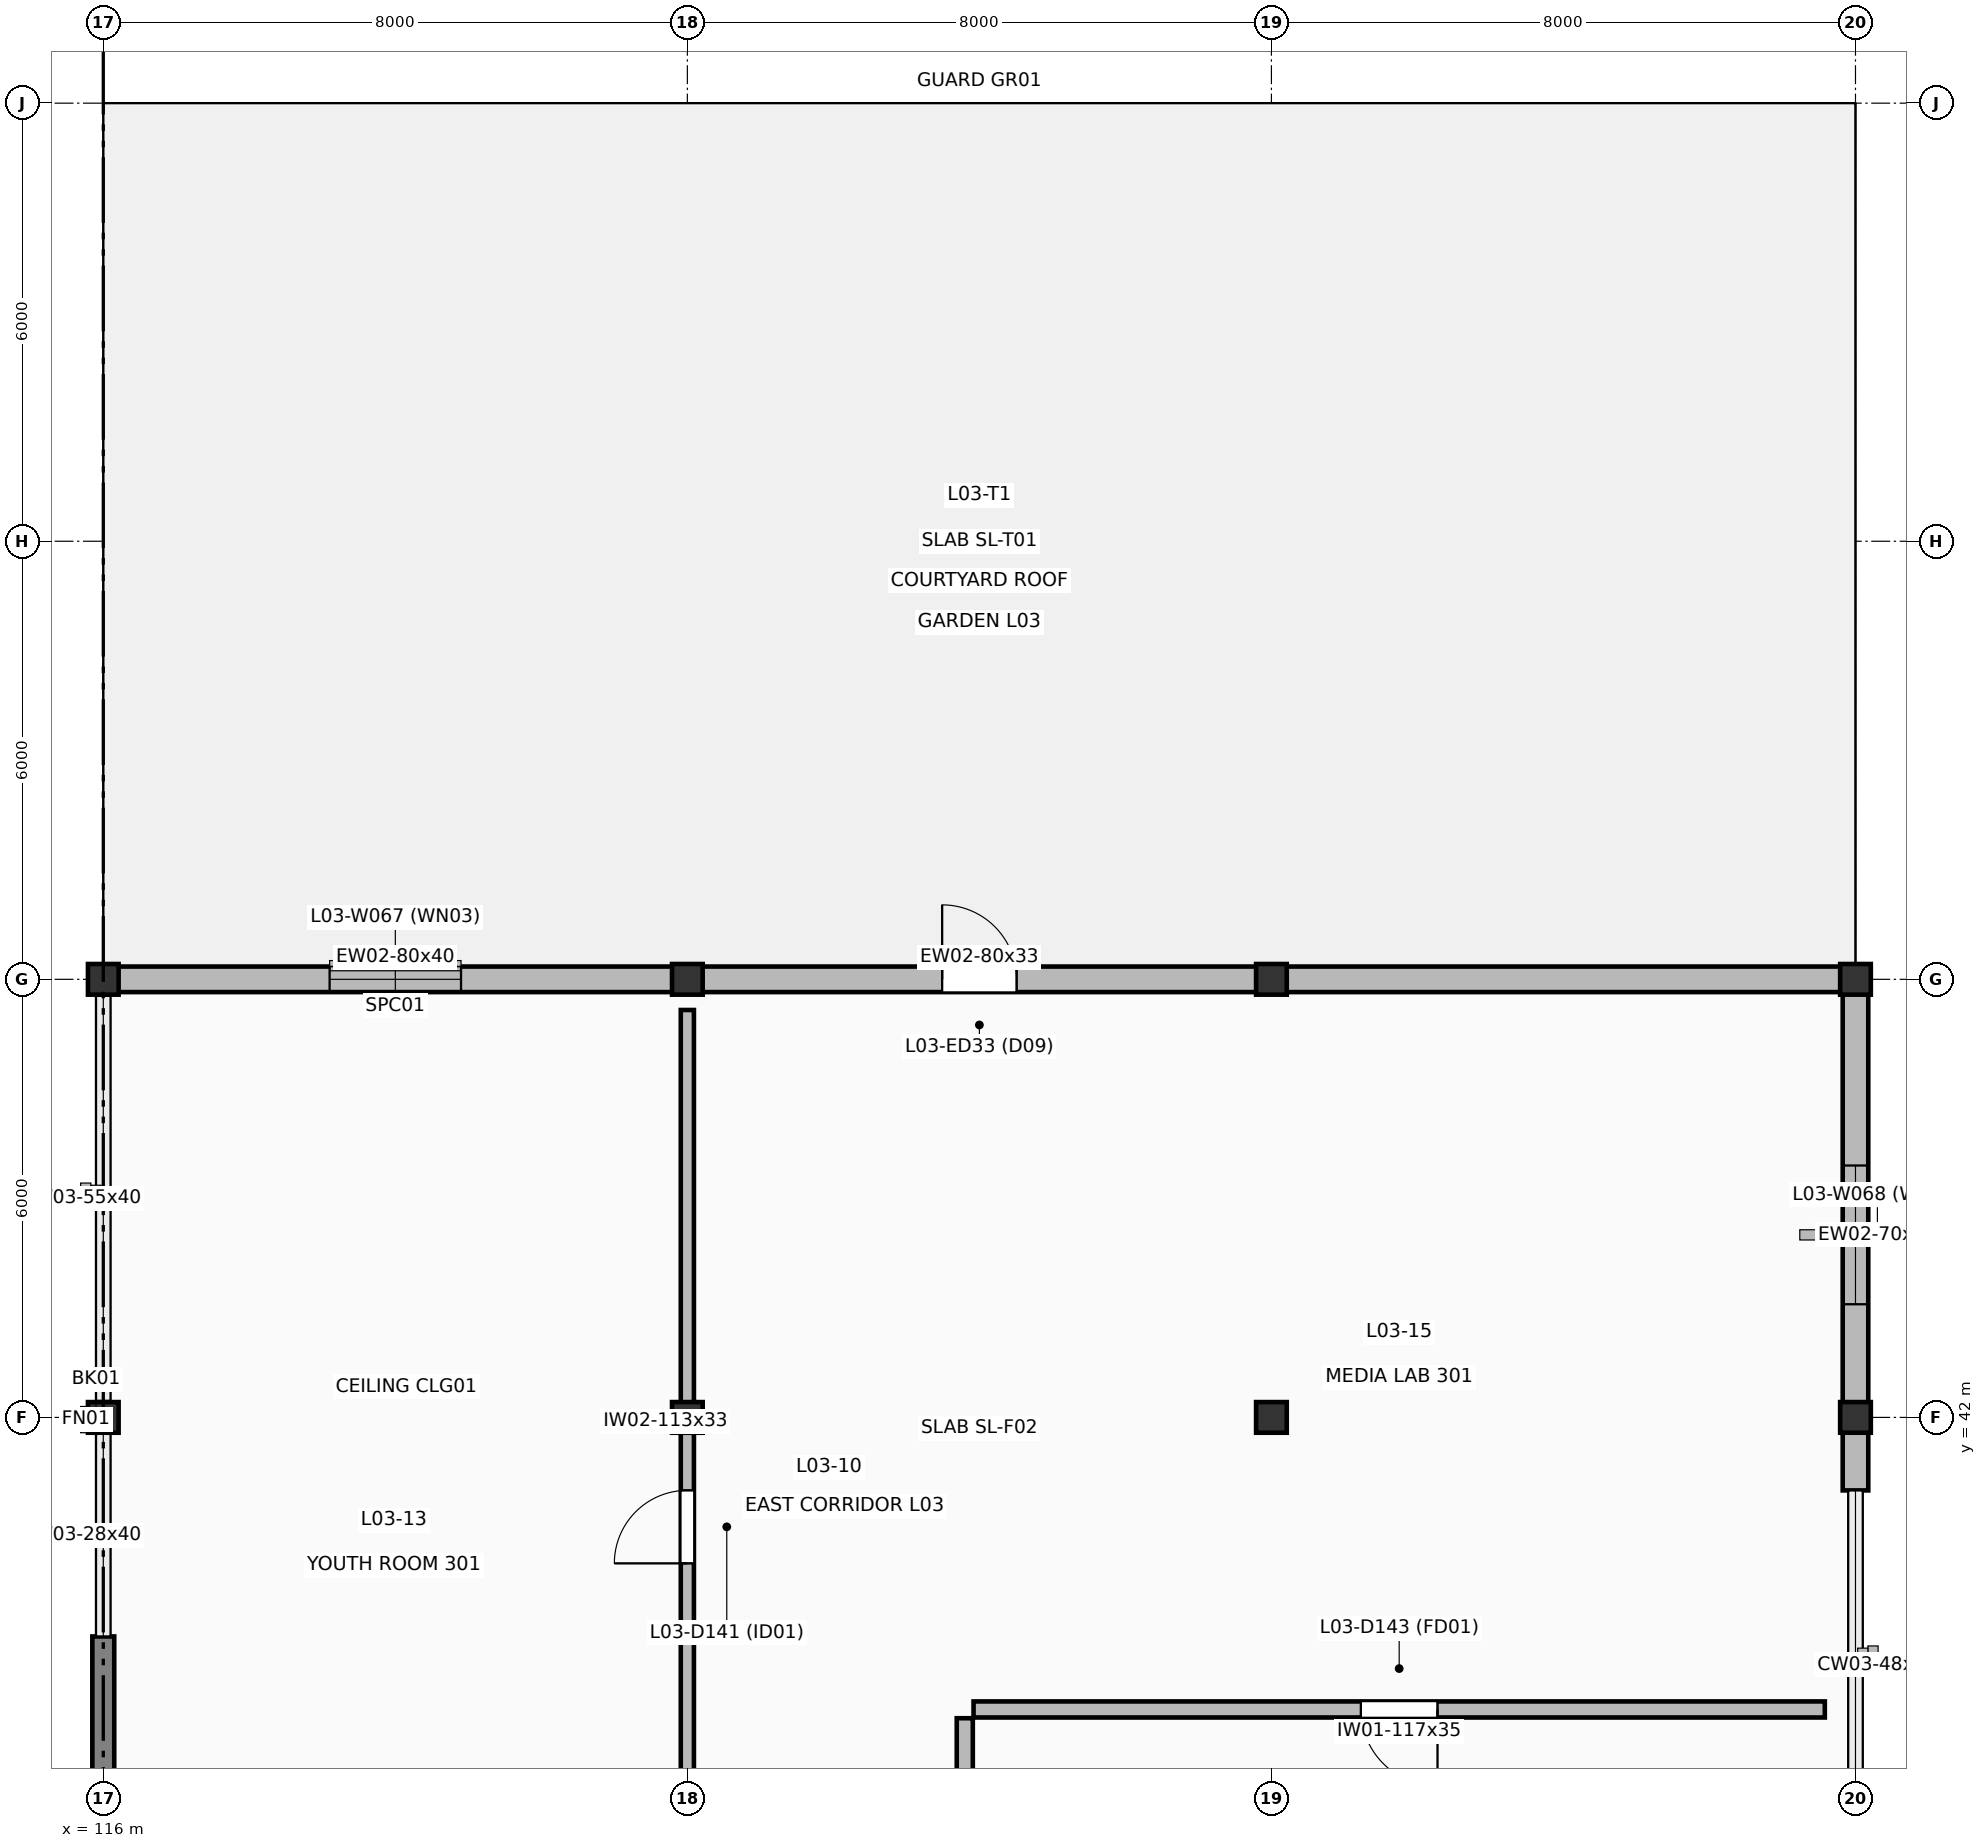
"""IFC4 building model, lengths in metres.
Left out: names, types, materials, properties, quantities, classifications, styles, units other than length and angle.
Written with IfcOpenShell. Run it as: python <this file> out.ifc"""

import sys

from ifc_helpers import new_model, si_unit, direction, frame, frame_2d, origin, origin_2d, place, context, subcontext, project, spatial, rectangle, extrude, element, fill, save


model = new_model("IFC4")
c1 = context("Model", 3, precision=1e-05, world=origin(), true_north=direction((0.0, 1.0)))
c2 = subcontext(c1, "Body", "Model", "MODEL_VIEW")
j1 = project(units=[si_unit("LENGTHUNIT", "METRE"), si_unit("PLANEANGLEUNIT", "RADIAN")], contexts=[c1])
p1 = place(None, origin())
s1 = spatial("IfcSite", under=j1, at=p1, CompositionType="ELEMENT")
p2 = place(p1, origin())
s2 = spatial("IfcBuilding", under=s1, at=p2, CompositionType="ELEMENT")
p3 = place(p2, frame((0.0, 0.0, 13.8)))
s3 = spatial("IfcBuildingStorey", under=s2, at=p3, CompositionType="ELEMENT", Elevation=13.8)
for number, where, z_axis, x_axis in (
    (1, (116.0, 42.0, 0.0), (0.0, 0.0, 1.0), (1.0, 0.0, 0.0)),
    (2, (116.0, 48.0, 0.0), (0.0, 0.0, 1.0), (1.0, 0.0, 0.0)),
    (3, (124.0, 42.0, 0.0), (0.0, 0.0, 1.0), (1.0, 0.0, 0.0)),
    (4, (124.0, 48.0, 0.0), (0.0, 0.0, 1.0), (1.0, 0.0, 0.0)),
    (5, (132.0, 42.0, 0.0), (0.0, 0.0, 1.0), (1.0, 0.0, 0.0)),
    (6, (132.0, 48.0, 0.0), (0.0, 0.0, 1.0), (1.0, 0.0, 0.0)),
    (7, (140.0, 42.0, 0.0), (0.0, 0.0, 1.0), (1.0, 0.0, 0.0)),
    (8, (140.0, 48.0, 0.0), (0.0, 0.0, 1.0), (1.0, 0.0, 0.0)),
):
    element("IfcColumn", number, at=place(p3, frame(where, z_axis=z_axis, x_axis=x_axis)), inside=s3, PredefinedType="COLUMN", context=c2, shape_type="SweptSolid", body=[
        extrude(rectangle(XDim=0.42, YDim=0.42, at=origin_2d()), origin(), (0.0, 0.0, 1.0), 4.2),
    ])
p4 = place(p3, frame((116.0, 30.0, 0.0), z_axis=(0.0, 0.0, 1.0), x_axis=(0.0, 1.0, 0.0)))
e9 = element("IfcWall", 9, at=p4, inside=s3, PredefinedType="SOLIDWALL", context=c2, shape_type="SweptSolid", body=[
    extrude(rectangle(XDim=9.0, YDim=0.3, at=frame_2d((4.5, 0.0))), origin(), (0.0, 0.0, 1.0), 4.2),
])
p5 = place(p3, frame((116.0, 48.0, 0.0), z_axis=(0.0, 0.0, 1.0), x_axis=(1.0, 0.0, 0.0)))
e10 = element("IfcWall", 10, at=p5, inside=s3, PredefinedType="SOLIDWALL", context=c2, shape_type="SweptSolid", body=[
    extrude(rectangle(XDim=8.0, YDim=0.35, at=frame_2d((4.0, 0.0))), origin(), (0.0, 0.0, 1.0), 3.98),
])
p6 = place(p5, frame((3.1, 0.0, 0.85)))
e11 = element("IfcOpeningElement", 11, at=p6, cuts=e10, PredefinedType="OPENING", context=c2, shape_type="SweptSolid", body=[
    extrude(rectangle(XDim=1.8, YDim=2.4, at=frame_2d((0.9, 1.2))), frame((0.0, 0.185, 0.0), z_axis=(0.0, -1.0, 0.0), x_axis=(1.0, 0.0, 0.0)), (0.0, 0.0, 1.0), 0.37),
])
p7 = place(p3, frame((124.0, 48.0, 0.0), z_axis=(0.0, 0.0, 1.0), x_axis=(1.0, 0.0, 0.0)))
e12 = element("IfcWall", 12, at=p7, inside=s3, PredefinedType="SOLIDWALL", context=c2, shape_type="SweptSolid", body=[
    extrude(rectangle(XDim=8.0, YDim=0.35, at=frame_2d((4.0, 0.0))), origin(), (0.0, 0.0, 1.0), 3.265),
])
p8 = place(p7, frame((3.49, 0.0, 0.0)))
e13 = element("IfcOpeningElement", 13, at=p8, cuts=e12, PredefinedType="OPENING", context=c2, shape_type="SweptSolid", body=[
    extrude(rectangle(XDim=1.02, YDim=2.18, at=frame_2d((0.51, 1.09))), frame((0.0, 0.185, 0.0), z_axis=(0.0, -1.0, 0.0), x_axis=(1.0, 0.0, 0.0)), (0.0, 0.0, 1.0), 0.37),
])
p9 = place(p3, frame((132.0, 48.0, 0.0), z_axis=(0.0, 0.0, 1.0), x_axis=(1.0, 0.0, 0.0)))
e14 = element("IfcWall", 14, at=p9, inside=s3, PredefinedType="SOLIDWALL", context=c2, shape_type="SweptSolid", body=[
    extrude(rectangle(XDim=8.0, YDim=0.35, at=frame_2d((4.0, 0.0))), origin(), (0.0, 0.0, 1.0), 3.265),
])
p10 = place(p3, frame((140.0, 48.0, 0.0), z_axis=(0.0, 0.0, 1.0), x_axis=(0.0, -1.0, 0.0)))
e15 = element("IfcWall", 15, at=p10, inside=s3, PredefinedType="SOLIDWALL", context=c2, shape_type="SweptSolid", body=[
    extrude(rectangle(XDim=7.0, YDim=0.35, at=frame_2d((3.5, 0.0))), origin(), (0.0, 0.0, 1.0), 3.345),
])
p11 = place(p10, frame((2.55, 0.0, 0.9)))
e16 = element("IfcOpeningElement", 16, at=p11, cuts=e15, PredefinedType="OPENING", context=c2, shape_type="SweptSolid", body=[
    extrude(rectangle(XDim=1.9, YDim=2.1, at=frame_2d((0.95, 1.05))), frame((0.0, 0.185, 0.0), z_axis=(0.0, -1.0, 0.0), x_axis=(1.0, 0.0, 0.0)), (0.0, 0.0, 1.0), 0.37),
])
p12 = place(p3, frame((124.0, 36.32, 0.0), z_axis=(0.0, 0.0, 1.0), x_axis=(0.0, 1.0, 0.0)))
e17 = element("IfcWall", 17, at=p12, inside=s3, PredefinedType="PARTITIONING", context=c2, shape_type="SweptSolid", body=[
    extrude(rectangle(XDim=11.26, YDim=0.18, at=frame_2d((5.63, 0.0))), origin(), (0.0, 0.0, 1.0), 3.345),
])
p13 = place(p12, frame((3.681, 0.0, 0.0)))
e18 = element("IfcOpeningElement", 18, at=p13, cuts=e17, PredefinedType="OPENING", context=c2, shape_type="SweptSolid", body=[
    extrude(rectangle(XDim=1.0, YDim=2.15, at=frame_2d((0.5, 1.075))), frame((0.0, 0.1, 0.0), z_axis=(0.0, -1.0, 0.0), x_axis=(1.0, 0.0, 0.0)), (0.0, 0.0, 1.0), 0.2),
])
p14 = place(p3, frame((139.58, 38.0, 0.0), z_axis=(0.0, 0.0, 1.0), x_axis=(-1.0, 0.0, 0.0)))
e19 = element("IfcWall", 19, at=p14, inside=s3, PredefinedType="SOLIDWALL", context=c2, shape_type="SweptSolid", body=[
    extrude(rectangle(XDim=11.66, YDim=0.22, at=frame_2d((5.83, 0.0))), origin(), (0.0, 0.0, 1.0), 3.485),
])
p15 = place(p14, frame((5.305, 0.0, 0.0)))
e20 = element("IfcOpeningElement", 20, at=p15, cuts=e19, PredefinedType="OPENING", context=c2, shape_type="SweptSolid", body=[
    extrude(rectangle(XDim=1.05, YDim=2.2, at=frame_2d((0.525, 1.1))), frame((0.0, 0.12, 0.0), z_axis=(0.0, -1.0, 0.0), x_axis=(1.0, 0.0, 0.0)), (0.0, 0.0, 1.0), 0.24),
])
p16 = place(p3, frame((127.8, 37.88, 0.0), z_axis=(0.0, 0.0, 1.0), x_axis=(0.0, -1.0, 0.0)))
e21 = element("IfcWall", 21, at=p16, inside=s3, PredefinedType="SOLIDWALL", context=c2, shape_type="SweptSolid", body=[
    extrude(rectangle(XDim=4.16, YDim=0.22, at=frame_2d((2.08, 0.0))), origin(), (0.0, 0.0, 1.0), 3.98),
])
p17 = place(p6, origin())
e22 = element("IfcWindow", 22, at=p17, inside=s3, PartitioningType="DOUBLE_PANEL_VERTICAL", PredefinedType="WINDOW", context=c2, shape_type="SweptSolid", body=[
    extrude(rectangle(XDim=1.8, YDim=2.4, at=frame_2d((0.9, 1.2))), frame((0.0, 0.03, 0.0), z_axis=(0.0, -1.0, 0.0), x_axis=(1.0, 0.0, 0.0)), (0.0, 0.0, 1.0), 0.06),
])
fill(e11, e22)
p18 = place(p8, origin())
e23 = element("IfcDoor", 23, at=p18, inside=s3, OperationType="SINGLE_SWING_LEFT", PredefinedType="DOOR", context=c2, shape_type="SweptSolid", body=[
    extrude(rectangle(XDim=1.02, YDim=2.18, at=frame_2d((0.51, 1.09))), frame((0.0, 0.025, 0.0), z_axis=(0.0, -1.0, 0.0), x_axis=(1.0, 0.0, 0.0)), (0.0, 0.0, 1.0), 0.05),
])
fill(e13, e23)
p19 = place(p11, origin())
e24 = element("IfcWindow", 24, at=p19, inside=s3, PartitioningType="DOUBLE_PANEL_VERTICAL", PredefinedType="WINDOW", context=c2, shape_type="SweptSolid", body=[
    extrude(rectangle(XDim=1.9, YDim=2.1, at=frame_2d((0.95, 1.05))), frame((0.0, 0.03, 0.0), z_axis=(0.0, -1.0, 0.0), x_axis=(1.0, 0.0, 0.0)), (0.0, 0.0, 1.0), 0.06),
])
fill(e16, e24)
p20 = place(p13, origin())
e25 = element("IfcDoor", 25, at=p20, inside=s3, OperationType="SINGLE_SWING_LEFT", PredefinedType="DOOR", context=c2, shape_type="SweptSolid", body=[
    extrude(rectangle(XDim=1.0, YDim=2.15, at=frame_2d((0.5, 1.075))), frame((0.0, 0.025, 0.0), z_axis=(0.0, -1.0, 0.0), x_axis=(1.0, 0.0, 0.0)), (0.0, 0.0, 1.0), 0.05),
])
fill(e18, e25)
p21 = place(p15, origin())
e26 = element("IfcDoor", 26, at=p21, inside=s3, OperationType="SINGLE_SWING_LEFT", PredefinedType="DOOR", context=c2, shape_type="SweptSolid", body=[
    extrude(rectangle(XDim=1.05, YDim=2.2, at=frame_2d((0.525, 1.1))), frame((0.0, 0.025, 0.0), z_axis=(0.0, -1.0, 0.0), x_axis=(1.0, 0.0, 0.0)), (0.0, 0.0, 1.0), 0.05),
])
fill(e20, e26)
save(model, sys.argv[1])
